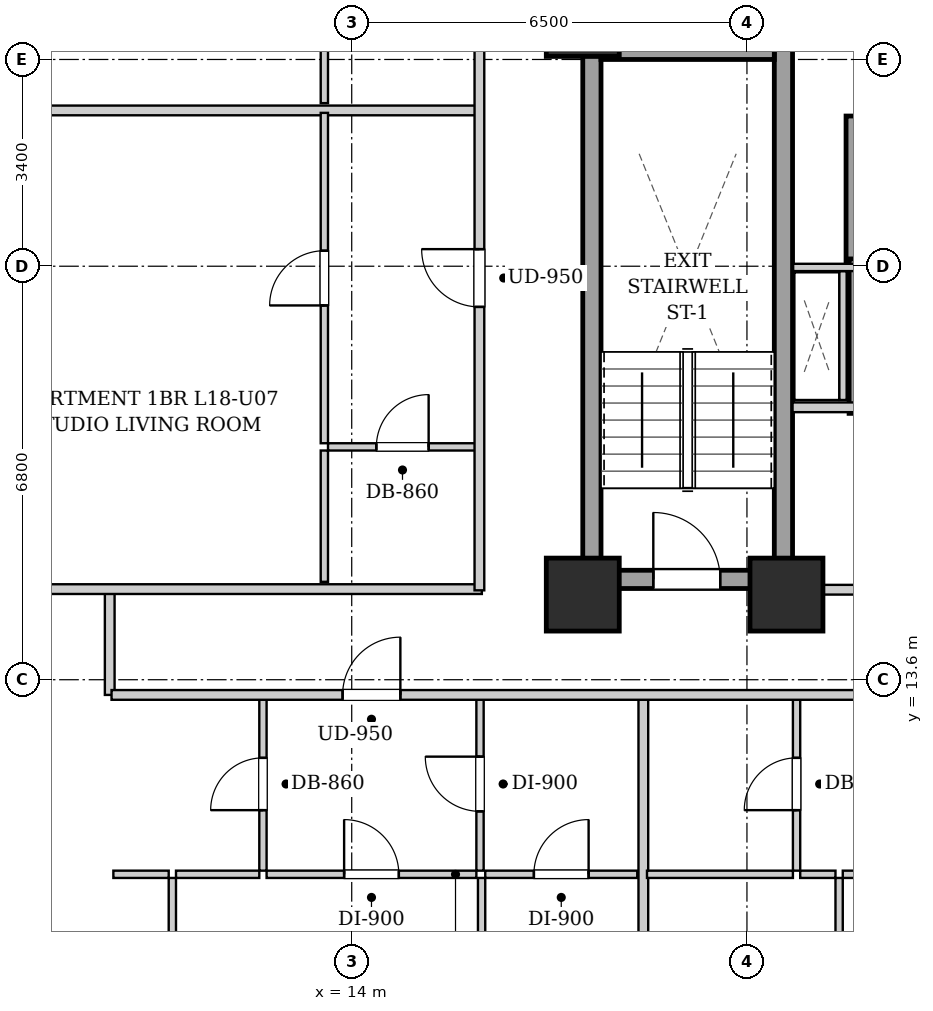
"""IFC4 building model, lengths in metres.
Left out: names, types, materials, properties, quantities, classifications, styles, units other than length and angle.
Written with IfcOpenShell. Run it as: python <this file> out.ifc"""

import sys

from ifc_helpers import new_model, si_unit, direction, frame, frame_2d, origin, origin_2d, place, context, subcontext, project, spatial, rectangle, extrude, element, fill, save


model = new_model("IFC4")
c1 = context("Model", 3, precision=1e-05, world=origin(), true_north=direction((0.0, 1.0)))
c2 = subcontext(c1, "Body", "Model", "MODEL_VIEW")
j1 = project(units=[si_unit("LENGTHUNIT", "METRE"), si_unit("PLANEANGLEUNIT", "RADIAN")], contexts=[c1])
p1 = place(None, origin())
s1 = spatial("IfcSite", under=j1, at=p1, CompositionType="ELEMENT")
p2 = place(p1, origin())
s2 = spatial("IfcBuilding", under=s1, at=p2, CompositionType="ELEMENT")
p3 = place(p2, frame((0.0, 0.0, 67.4)))
s3 = spatial("IfcBuildingStorey", under=s2, at=p3, CompositionType="ELEMENT", Elevation=67.4)
for number, where, z_axis, x_axis in (
    (1, (17.8, 15.0, 0.0), (0.0, 0.0, 1.0), (1.0, 0.0, 0.0)),
    (2, (21.15, 15.0, 0.0), (0.0, 0.0, 1.0), (1.0, 0.0, 0.0)),
    (3, (17.8, 24.45, 0.0), (0.0, 0.0, 1.0), (1.0, 0.0, 0.0)),
):
    element("IfcColumn", number, at=place(p3, frame(where, z_axis=z_axis, x_axis=x_axis)), inside=s3, PredefinedType="COLUMN", context=c2, shape_type="SweptSolid", body=[
        extrude(rectangle(XDim=1.2, YDim=1.2, at=origin_2d()), origin(), (0.0, 0.0, 1.0), 3.2),
    ])
for number, where, z_axis, x_axis in (
    (4, (17.95, 15.1, 0.0), (0.0, 0.0, 1.0), (0.0, 1.0, 0.0)),
    (5, (21.1, 15.1, 0.0), (0.0, 0.0, 1.0), (0.0, 1.0, 0.0)),
):
    element("IfcWall", number, at=place(p3, frame(where, z_axis=z_axis, x_axis=x_axis)), inside=s3, PredefinedType="SHEAR", context=c2, shape_type="SweptSolid", body=[
        extrude(rectangle(XDim=9.0, YDim=0.3, at=frame_2d((4.5, 0.0))), origin(), (0.0, 0.0, 1.0), 2.88),
    ])
p4 = place(p3, frame((18.1, 23.95, 0.0), z_axis=(0.0, 0.0, 1.0), x_axis=(1.0, 0.0, 0.0)))
e6 = element("IfcWall", 6, at=p4, inside=s3, PredefinedType="SHEAR", context=c2, shape_type="SweptSolid", body=[
    extrude(rectangle(XDim=2.85, YDim=0.3, at=frame_2d((1.425, 0.0))), origin(), (0.0, 0.0, 1.0), 2.88),
])
p5 = place(p3, frame((18.1, 15.25, 0.0), z_axis=(0.0, 0.0, 1.0), x_axis=(1.0, 0.0, 0.0)))
e7 = element("IfcWall", 7, at=p5, inside=s3, PredefinedType="SHEAR", context=c2, shape_type="SweptSolid", body=[
    extrude(rectangle(XDim=2.85, YDim=0.3, at=frame_2d((1.425, 0.0))), origin(), (0.0, 0.0, 1.0), 2.88),
])
p6 = place(p5, frame((0.86, 0.0, 0.0)))
e8 = element("IfcOpeningElement", 8, at=p6, cuts=e7, PredefinedType="OPENING", context=c2, shape_type="SweptSolid", body=[
    extrude(rectangle(XDim=1.1, YDim=2.05, at=frame_2d((0.55, 1.025))), frame((0.0, 0.16, 0.0), z_axis=(0.0, -1.0, 0.0), x_axis=(1.0, 0.0, 0.0)), (0.0, 0.0, 1.0), 0.32),
])
p7 = place(p3, frame((22.24, 20.43, 0.0), z_axis=(0.0, 0.0, 1.0), x_axis=(0.0, 1.0, 0.0)))
e9 = element("IfcWall", 9, at=p7, inside=s3, PredefinedType="SHEAR", context=c2, shape_type="SweptSolid", body=[
    extrude(rectangle(XDim=2.44, YDim=0.22, at=frame_2d((1.22, 0.0))), origin(), (0.0, 0.0, 1.0), 2.88),
])
p8 = place(p3, frame((22.29, 17.98, 0.0), z_axis=(0.0, 0.0, 1.0), x_axis=(0.0, 1.0, 0.0)))
e10 = element("IfcWall", 10, at=p8, inside=s3, PredefinedType="SHEAR", context=c2, shape_type="SweptSolid", body=[
    extrude(rectangle(XDim=2.54, YDim=0.22, at=frame_2d((1.27, 0.0))), origin(), (0.0, 0.0, 1.0), 2.88),
])
p9 = place(p3, frame((21.25, 15.08, 0.0), z_axis=(0.0, 0.0, 1.0), x_axis=(1.0, 0.0, 0.0)))
e11 = element("IfcWall", 11, at=p9, inside=s3, PredefinedType="PARTITIONING", context=c2, shape_type="SweptSolid", body=[
    extrude(rectangle(XDim=8.5, YDim=0.16, at=frame_2d((4.25, 0.0))), origin(), (0.0, 0.0, 1.0), 2.172),
])
p10 = place(p9, frame((3.725, 0.0, 0.0)))
e12 = element("IfcOpeningElement", 12, at=p10, cuts=e11, PredefinedType="OPENING", context=c2, shape_type="SweptSolid", body=[
    extrude(rectangle(XDim=1.05, YDim=2.05, at=frame_2d((0.525, 1.025))), frame((0.0, 0.09, 0.0), z_axis=(0.0, -1.0, 0.0), x_axis=(1.0, 0.0, 0.0)), (0.0, 0.0, 1.0), 0.18),
])
p11 = place(p3, frame((21.25, 18.08, 0.0), z_axis=(0.0, 0.0, 1.0), x_axis=(1.0, 0.0, 0.0)))
e13 = element("IfcWall", 13, at=p11, inside=s3, PredefinedType="PARTITIONING", context=c2, shape_type="SweptSolid", body=[
    extrude(rectangle(XDim=1.1, YDim=0.16, at=frame_2d((0.55, 0.0))), origin(), (0.0, 0.0, 1.0), 2.88),
])
p12 = place(p3, frame((22.08, 18.2, 0.0), z_axis=(0.0, 0.0, 1.0), x_axis=(0.0, 1.0, 0.0)))
e14 = element("IfcWall", 14, at=p12, inside=s3, PredefinedType="PARTITIONING", context=c2, shape_type="SweptSolid", body=[
    extrude(rectangle(XDim=2.12, YDim=0.12, at=frame_2d((1.06, 0.0))), origin(), (0.0, 0.0, 1.0), 2.88),
])
p13 = place(p3, frame((22.28, 20.38, 0.0), z_axis=(0.0, 0.0, 1.0), x_axis=(-1.0, 0.0, 0.0)))
e15 = element("IfcWall", 15, at=p13, inside=s3, PredefinedType="PARTITIONING", context=c2, shape_type="SweptSolid", body=[
    extrude(rectangle(XDim=1.02, YDim=0.12, at=frame_2d((0.51, 0.0))), origin(), (0.0, 0.0, 1.0), 2.88),
])
p14 = place(p3, frame((10.02, 13.35, 0.0), z_axis=(0.0, 0.0, 1.0), x_axis=(0.0, 1.0, 0.0)))
e16 = element("IfcWall", 16, at=p14, inside=s3, PredefinedType="PARTITIONING", context=c2, shape_type="SweptSolid", body=[
    extrude(rectangle(XDim=1.74, YDim=0.16, at=frame_2d((0.87, 0.0))), origin(), (0.0, 0.0, 1.0), 2.88),
])
p15 = place(p3, frame((7.78, 15.09, 0.0), z_axis=(0.0, 0.0, 1.0), x_axis=(1.0, 0.0, 0.0)))
e17 = element("IfcWall", 17, at=p15, inside=s3, PredefinedType="PARTITIONING", context=c2, shape_type="SweptSolid", body=[
    extrude(rectangle(XDim=8.36, YDim=0.16, at=frame_2d((4.18, 0.0))), origin(), (0.0, 0.0, 1.0), 2.172),
])
p16 = place(p3, frame((12.54, 10.46, 0.0), z_axis=(0.0, 0.0, 1.0), x_axis=(0.0, 1.0, 0.0)))
e18 = element("IfcWall", 18, at=p16, inside=s3, PredefinedType="PARTITIONING", context=c2, shape_type="SweptSolid", body=[
    extrude(rectangle(XDim=2.85, YDim=0.12, at=frame_2d((1.425, 0.0))), origin(), (0.0, 0.0, 1.0), 2.88),
])
p17 = place(p16, frame((0.995, 0.0, 0.0)))
e19 = element("IfcOpeningElement", 19, at=p17, cuts=e18, PredefinedType="OPENING", context=c2, shape_type="SweptSolid", body=[
    extrude(rectangle(XDim=0.86, YDim=2.05, at=frame_2d((0.43, 1.025))), frame((0.0, 0.07, 0.0), z_axis=(0.0, -1.0, 0.0), x_axis=(1.0, 0.0, 0.0)), (0.0, 0.0, 1.0), 0.14),
])
p18 = place(p3, frame((10.08, 10.4, 0.0), z_axis=(0.0, 0.0, 1.0), x_axis=(1.0, 0.0, 0.0)))
e20 = element("IfcWall", 20, at=p18, inside=s3, PredefinedType="PARTITIONING", context=c2, shape_type="SweptSolid", body=[
    extrude(rectangle(XDim=0.91, YDim=0.12, at=frame_2d((0.455, 0.0))), origin(), (0.0, 0.0, 1.0), 2.88),
])
p19 = place(p3, frame((11.11, 10.4, 0.0), z_axis=(0.0, 0.0, 1.0), x_axis=(1.0, 0.0, 0.0)))
e21 = element("IfcWall", 21, at=p19, inside=s3, PredefinedType="PARTITIONING", context=c2, shape_type="SweptSolid", body=[
    extrude(rectangle(XDim=1.37, YDim=0.12, at=frame_2d((0.685, 0.0))), origin(), (0.0, 0.0, 1.0), 2.88),
])
p20 = place(p3, frame((16.11, 10.46, 0.0), z_axis=(0.0, 0.0, 1.0), x_axis=(0.0, 1.0, 0.0)))
e22 = element("IfcWall", 22, at=p20, inside=s3, PredefinedType="PARTITIONING", context=c2, shape_type="SweptSolid", body=[
    extrude(rectangle(XDim=2.85, YDim=0.12, at=frame_2d((1.425, 0.0))), origin(), (0.0, 0.0, 1.0), 2.88),
])
p21 = place(p20, frame((0.975, 0.0, 0.0)))
e23 = element("IfcOpeningElement", 23, at=p21, cuts=e22, PredefinedType="OPENING", context=c2, shape_type="SweptSolid", body=[
    extrude(rectangle(XDim=0.9, YDim=2.05, at=frame_2d((0.45, 1.025))), frame((0.0, 0.07, 0.0), z_axis=(0.0, -1.0, 0.0), x_axis=(1.0, 0.0, 0.0)), (0.0, 0.0, 1.0), 0.14),
])
p22 = place(p3, frame((12.6, 10.4, 0.0), z_axis=(0.0, 0.0, 1.0), x_axis=(1.0, 0.0, 0.0)))
e24 = element("IfcWall", 24, at=p22, inside=s3, PredefinedType="PARTITIONING", context=c2, shape_type="SweptSolid", body=[
    extrude(rectangle(XDim=3.45, YDim=0.12, at=frame_2d((1.725, 0.0))), origin(), (0.0, 0.0, 1.0), 2.88),
])
p23 = place(p22, frame((1.275, 0.0, 0.0)))
e25 = element("IfcOpeningElement", 25, at=p23, cuts=e24, PredefinedType="OPENING", context=c2, shape_type="SweptSolid", body=[
    extrude(rectangle(XDim=0.9, YDim=2.05, at=frame_2d((0.45, 1.025))), frame((0.0, 0.07, 0.0), z_axis=(0.0, -1.0, 0.0), x_axis=(1.0, 0.0, 0.0)), (0.0, 0.0, 1.0), 0.14),
])
p24 = place(p3, frame((16.196, 10.4, 0.0), z_axis=(0.0, 0.0, 1.0), x_axis=(1.0, 0.0, 0.0)))
e26 = element("IfcWall", 26, at=p24, inside=s3, PredefinedType="PARTITIONING", context=c2, shape_type="SweptSolid", body=[
    extrude(rectangle(XDim=2.5, YDim=0.12, at=frame_2d((1.25, 0.0))), origin(), (0.0, 0.0, 1.0), 2.88),
])
p25 = place(p24, frame((0.8, 0.0, 0.0)))
e27 = element("IfcOpeningElement", 27, at=p25, cuts=e26, PredefinedType="OPENING", context=c2, shape_type="SweptSolid", body=[
    extrude(rectangle(XDim=0.9, YDim=2.05, at=frame_2d((0.45, 1.025))), frame((0.0, 0.07, 0.0), z_axis=(0.0, -1.0, 0.0), x_axis=(1.0, 0.0, 0.0)), (0.0, 0.0, 1.0), 0.14),
])
p26 = place(p3, frame((11.05, 0.28, 0.0), z_axis=(0.0, 0.0, 1.0), x_axis=(0.0, 1.0, 0.0)))
e28 = element("IfcWall", 28, at=p26, inside=s3, PredefinedType="PARTITIONING", context=c2, shape_type="SweptSolid", body=[
    extrude(rectangle(XDim=10.06, YDim=0.12, at=frame_2d((5.03, 0.0))), origin(), (0.0, 0.0, 1.0), 2.88),
])
p27 = place(p26, frame((4.565, 0.0, 0.0)))
e29 = element("IfcOpeningElement", 29, at=p27, cuts=e28, PredefinedType="OPENING", context=c2, shape_type="SweptSolid", body=[
    extrude(rectangle(XDim=0.9, YDim=2.05, at=frame_2d((0.45, 1.025))), frame((0.0, 0.07, 0.0), z_axis=(0.0, -1.0, 0.0), x_axis=(1.0, 0.0, 0.0)), (0.0, 0.0, 1.0), 0.14),
])
p28 = place(p3, frame((16.136, 2.43, 0.0), z_axis=(0.0, 0.0, 1.0), x_axis=(0.0, 1.0, 0.0)))
e30 = element("IfcWall", 30, at=p28, inside=s3, PredefinedType="PARTITIONING", context=c2, shape_type="SweptSolid", body=[
    extrude(rectangle(XDim=7.91, YDim=0.12, at=frame_2d((3.955, 0.0))), origin(), (0.0, 0.0, 1.0), 2.88),
])
p29 = place(p28, frame((3.505, 0.0, 0.0)))
e31 = element("IfcOpeningElement", 31, at=p29, cuts=e30, PredefinedType="OPENING", context=c2, shape_type="SweptSolid", body=[
    extrude(rectangle(XDim=0.9, YDim=2.05, at=frame_2d((0.45, 1.025))), frame((0.0, 0.07, 0.0), z_axis=(0.0, -1.0, 0.0), x_axis=(1.0, 0.0, 0.0)), (0.0, 0.0, 1.0), 0.14),
])
p30 = place(p3, frame((18.796, 0.28, 0.0), z_axis=(0.0, 0.0, 1.0), x_axis=(0.0, 1.0, 0.0)))
e32 = element("IfcWall", 32, at=p30, inside=s3, PredefinedType="PARTITIONING", context=c2, shape_type="SweptSolid", body=[
    extrude(rectangle(XDim=13.03, YDim=0.16, at=frame_2d((6.515, 0.0))), origin(), (0.0, 0.0, 1.0), 2.88),
])
p31 = place(p3, frame((21.316, 10.46, 0.0), z_axis=(0.0, 0.0, 1.0), x_axis=(0.0, 1.0, 0.0)))
e33 = element("IfcWall", 33, at=p31, inside=s3, PredefinedType="PARTITIONING", context=c2, shape_type="SweptSolid", body=[
    extrude(rectangle(XDim=2.85, YDim=0.12, at=frame_2d((1.425, 0.0))), origin(), (0.0, 0.0, 1.0), 2.88),
])
p32 = place(p31, frame((0.995, 0.0, 0.0)))
e34 = element("IfcOpeningElement", 34, at=p32, cuts=e33, PredefinedType="OPENING", context=c2, shape_type="SweptSolid", body=[
    extrude(rectangle(XDim=0.86, YDim=2.05, at=frame_2d((0.43, 1.025))), frame((0.0, 0.07, 0.0), z_axis=(0.0, -1.0, 0.0), x_axis=(1.0, 0.0, 0.0)), (0.0, 0.0, 1.0), 0.14),
])
p33 = place(p3, frame((18.856, 10.4, 0.0), z_axis=(0.0, 0.0, 1.0), x_axis=(1.0, 0.0, 0.0)))
e35 = element("IfcWall", 35, at=p33, inside=s3, PredefinedType="PARTITIONING", context=c2, shape_type="SweptSolid", body=[
    extrude(rectangle(XDim=2.4, YDim=0.12, at=frame_2d((1.2, 0.0))), origin(), (0.0, 0.0, 1.0), 2.88),
])
p34 = place(p3, frame((21.376, 10.4, 0.0), z_axis=(0.0, 0.0, 1.0), x_axis=(1.0, 0.0, 0.0)))
e36 = element("IfcWall", 36, at=p34, inside=s3, PredefinedType="PARTITIONING", context=c2, shape_type="SweptSolid", body=[
    extrude(rectangle(XDim=0.58, YDim=0.12, at=frame_2d((0.29, 0.0))), origin(), (0.0, 0.0, 1.0), 2.88),
])
p35 = place(p3, frame((22.076, 10.4, 0.0), z_axis=(0.0, 0.0, 1.0), x_axis=(1.0, 0.0, 0.0)))
e37 = element("IfcWall", 37, at=p35, inside=s3, PredefinedType="PARTITIONING", context=c2, shape_type="SweptSolid", body=[
    extrude(rectangle(XDim=3.1, YDim=0.12, at=frame_2d((1.55, 0.0))), origin(), (0.0, 0.0, 1.0), 2.88),
])
p36 = place(p35, frame((1.1, 0.0, 0.0)))
e38 = element("IfcOpeningElement", 38, at=p36, cuts=e37, PredefinedType="OPENING", context=c2, shape_type="SweptSolid", body=[
    extrude(rectangle(XDim=0.9, YDim=2.05, at=frame_2d((0.45, 1.025))), frame((0.0, 0.07, 0.0), z_axis=(0.0, -1.0, 0.0), x_axis=(1.0, 0.0, 0.0)), (0.0, 0.0, 1.0), 0.14),
])
p37 = place(p3, frame((22.016, 0.28, 0.0), z_axis=(0.0, 0.0, 1.0), x_axis=(0.0, 1.0, 0.0)))
e39 = element("IfcWall", 39, at=p37, inside=s3, PredefinedType="PARTITIONING", context=c2, shape_type="SweptSolid", body=[
    extrude(rectangle(XDim=10.06, YDim=0.12, at=frame_2d((5.03, 0.0))), origin(), (0.0, 0.0, 1.0), 2.88),
])
p38 = place(p37, frame((4.565, 0.0, 0.0)))
e40 = element("IfcOpeningElement", 40, at=p38, cuts=e39, PredefinedType="OPENING", context=c2, shape_type="SweptSolid", body=[
    extrude(rectangle(XDim=0.9, YDim=2.05, at=frame_2d((0.45, 1.025))), frame((0.0, 0.07, 0.0), z_axis=(0.0, -1.0, 0.0), x_axis=(1.0, 0.0, 0.0)), (0.0, 0.0, 1.0), 0.14),
])
p39 = place(p3, frame((7.78, 22.962, 0.0), z_axis=(0.0, 0.0, 1.0), x_axis=(1.0, 0.0, 0.0)))
e41 = element("IfcWall", 41, at=p39, inside=s3, PredefinedType="PARTITIONING", context=c2, shape_type="SweptSolid", body=[
    extrude(rectangle(XDim=8.28, YDim=0.16, at=frame_2d((4.14, 0.0))), origin(), (0.0, 0.0, 1.0), 2.88),
])
p40 = place(p3, frame((13.61, 17.429, 0.0), z_axis=(0.0, 0.0, 1.0), x_axis=(1.0, 0.0, 0.0)))
e42 = element("IfcWall", 42, at=p40, inside=s3, PredefinedType="PARTITIONING", context=c2, shape_type="SweptSolid", body=[
    extrude(rectangle(XDim=2.45, YDim=0.12, at=frame_2d((1.225, 0.0))), origin(), (0.0, 0.0, 1.0), 2.88),
])
p41 = place(p40, frame((0.795, 0.0, 0.0)))
e43 = element("IfcOpeningElement", 43, at=p41, cuts=e42, PredefinedType="OPENING", context=c2, shape_type="SweptSolid", body=[
    extrude(rectangle(XDim=0.86, YDim=2.05, at=frame_2d((0.43, 1.025))), frame((0.0, 0.07, 0.0), z_axis=(0.0, -1.0, 0.0), x_axis=(1.0, 0.0, 0.0)), (0.0, 0.0, 1.0), 0.14),
])
p42 = place(p3, frame((13.55, 15.21, 0.0), z_axis=(0.0, 0.0, 1.0), x_axis=(0.0, 1.0, 0.0)))
e44 = element("IfcWall", 44, at=p42, inside=s3, PredefinedType="PARTITIONING", context=c2, shape_type="SweptSolid", body=[
    extrude(rectangle(XDim=2.159, YDim=0.12, at=frame_2d((1.08, 0.0))), origin(), (0.0, 0.0, 1.0), 2.88),
])
p43 = place(p3, frame((13.55, 17.489, 0.0), z_axis=(0.0, 0.0, 1.0), x_axis=(0.0, 1.0, 0.0)))
e45 = element("IfcWall", 45, at=p43, inside=s3, PredefinedType="PARTITIONING", context=c2, shape_type="SweptSolid", body=[
    extrude(rectangle(XDim=5.433, YDim=0.12, at=frame_2d((2.717, 0.0))), origin(), (0.0, 0.0, 1.0), 2.88),
])
p44 = place(p43, frame((2.266, 0.0, 0.0)))
e46 = element("IfcOpeningElement", 46, at=p44, cuts=e45, PredefinedType="OPENING", context=c2, shape_type="SweptSolid", body=[
    extrude(rectangle(XDim=0.9, YDim=2.05, at=frame_2d((0.45, 1.025))), frame((0.0, 0.07, 0.0), z_axis=(0.0, -1.0, 0.0), x_axis=(1.0, 0.0, 0.0)), (0.0, 0.0, 1.0), 0.14),
])
p45 = place(p3, frame((13.55, 23.082, 0.0), z_axis=(0.0, 0.0, 1.0), x_axis=(0.0, 1.0, 0.0)))
e47 = element("IfcWall", 47, at=p45, inside=s3, PredefinedType="PARTITIONING", context=c2, shape_type="SweptSolid", body=[
    extrude(rectangle(XDim=1.85, YDim=0.12, at=frame_2d((0.925, 0.0))), origin(), (0.0, 0.0, 1.0), 2.88),
])
p46 = place(p3, frame((10.05, 13.35, 0.0), z_axis=(0.0, 0.0, 1.0), x_axis=(1.0, 0.0, 0.0)))
e48 = element("IfcWall", 48, at=p46, inside=s3, PredefinedType="PARTITIONING", context=c2, shape_type="SweptSolid", body=[
    extrude(rectangle(XDim=33.9, YDim=0.16, at=frame_2d((16.95, 0.0))), origin(), (0.0, 0.0, 1.0), 2.88),
])
p47 = place(p46, frame((3.8, 0.0, 0.0)))
e49 = element("IfcOpeningElement", 49, at=p47, cuts=e48, PredefinedType="OPENING", context=c2, shape_type="SweptSolid", body=[
    extrude(rectangle(XDim=0.95, YDim=2.1, at=frame_2d((0.475, 1.05))), frame((0.0, 0.09, 0.0), z_axis=(0.0, -1.0, 0.0), x_axis=(1.0, 0.0, 0.0)), (0.0, 0.0, 1.0), 0.18),
])
p48 = place(p46, frame((13.071, 0.0, 0.0)))
e50 = element("IfcOpeningElement", 50, at=p48, cuts=e48, PredefinedType="OPENING", context=c2, shape_type="SweptSolid", body=[
    extrude(rectangle(XDim=0.95, YDim=2.1, at=frame_2d((0.475, 1.05))), frame((0.0, 0.09, 0.0), z_axis=(0.0, -1.0, 0.0), x_axis=(1.0, 0.0, 0.0)), (0.0, 0.0, 1.0), 0.18),
])
p49 = place(p3, frame((16.1, 15.07, 0.0), z_axis=(0.0, 0.0, 1.0), x_axis=(0.0, 1.0, 0.0)))
e51 = element("IfcWall", 51, at=p49, inside=s3, PredefinedType="PARTITIONING", context=c2, shape_type="SweptSolid", body=[
    extrude(rectangle(XDim=13.93, YDim=0.16, at=frame_2d((6.965, 0.0))), origin(), (0.0, 0.0, 1.0), 2.88),
])
p50 = place(p49, frame((4.661, 0.0, 0.0)))
e52 = element("IfcOpeningElement", 52, at=p50, cuts=e51, PredefinedType="OPENING", context=c2, shape_type="SweptSolid", body=[
    extrude(rectangle(XDim=0.95, YDim=2.1, at=frame_2d((0.475, 1.05))), frame((0.0, 0.09, 0.0), z_axis=(0.0, -1.0, 0.0), x_axis=(1.0, 0.0, 0.0)), (0.0, 0.0, 1.0), 0.18),
])
p51 = place(p49, frame((11.411, 0.0, 0.0)))
e53 = element("IfcOpeningElement", 53, at=p51, cuts=e51, PredefinedType="OPENING", context=c2, shape_type="SweptSolid", body=[
    extrude(rectangle(XDim=0.95, YDim=2.1, at=frame_2d((0.475, 1.05))), frame((0.0, 0.09, 0.0), z_axis=(0.0, -1.0, 0.0), x_axis=(1.0, 0.0, 0.0)), (0.0, 0.0, 1.0), 0.18),
])
p52 = place(p6, origin())
e54 = element("IfcDoor", 54, at=p52, inside=s3, OperationType="SINGLE_SWING_LEFT", PredefinedType="DOOR", context=c2, shape_type="SweptSolid", body=[
    extrude(rectangle(XDim=1.1, YDim=2.05, at=frame_2d((0.55, 1.025))), frame((0.0, 0.025, 0.0), z_axis=(0.0, -1.0, 0.0), x_axis=(1.0, 0.0, 0.0)), (0.0, 0.0, 1.0), 0.05),
])
fill(e8, e54)
p53 = place(p17, origin())
e55 = element("IfcDoor", 55, at=p53, inside=s3, OperationType="SINGLE_SWING_LEFT", PredefinedType="DOOR", context=c2, shape_type="SweptSolid", body=[
    extrude(rectangle(XDim=0.86, YDim=2.05, at=frame_2d((0.43, 1.025))), frame((0.0, 0.025, 0.0), z_axis=(0.0, -1.0, 0.0), x_axis=(1.0, 0.0, 0.0)), (0.0, 0.0, 1.0), 0.05),
])
fill(e19, e55)
p54 = place(p21, origin())
e56 = element("IfcDoor", 56, at=p54, inside=s3, OperationType="SINGLE_SWING_RIGHT", PredefinedType="DOOR", context=c2, shape_type="SweptSolid", body=[
    extrude(rectangle(XDim=0.9, YDim=2.05, at=frame_2d((0.45, 1.025))), frame((0.0, 0.025, 0.0), z_axis=(0.0, -1.0, 0.0), x_axis=(1.0, 0.0, 0.0)), (0.0, 0.0, 1.0), 0.05),
])
fill(e23, e56)
p55 = place(p23, origin())
e57 = element("IfcDoor", 57, at=p55, inside=s3, OperationType="SINGLE_SWING_LEFT", PredefinedType="DOOR", context=c2, shape_type="SweptSolid", body=[
    extrude(rectangle(XDim=0.9, YDim=2.05, at=frame_2d((0.45, 1.025))), frame((0.0, 0.025, 0.0), z_axis=(0.0, -1.0, 0.0), x_axis=(1.0, 0.0, 0.0)), (0.0, 0.0, 1.0), 0.05),
])
fill(e25, e57)
p56 = place(p25, origin())
e58 = element("IfcDoor", 58, at=p56, inside=s3, OperationType="SINGLE_SWING_RIGHT", PredefinedType="DOOR", context=c2, shape_type="SweptSolid", body=[
    extrude(rectangle(XDim=0.9, YDim=2.05, at=frame_2d((0.45, 1.025))), frame((0.0, 0.025, 0.0), z_axis=(0.0, -1.0, 0.0), x_axis=(1.0, 0.0, 0.0)), (0.0, 0.0, 1.0), 0.05),
])
fill(e27, e58)
p57 = place(p32, origin())
e59 = element("IfcDoor", 59, at=p57, inside=s3, OperationType="SINGLE_SWING_LEFT", PredefinedType="DOOR", context=c2, shape_type="SweptSolid", body=[
    extrude(rectangle(XDim=0.86, YDim=2.05, at=frame_2d((0.43, 1.025))), frame((0.0, 0.025, 0.0), z_axis=(0.0, -1.0, 0.0), x_axis=(1.0, 0.0, 0.0)), (0.0, 0.0, 1.0), 0.05),
])
fill(e34, e59)
p58 = place(p41, origin())
e60 = element("IfcDoor", 60, at=p58, inside=s3, OperationType="SINGLE_SWING_RIGHT", PredefinedType="DOOR", context=c2, shape_type="SweptSolid", body=[
    extrude(rectangle(XDim=0.86, YDim=2.05, at=frame_2d((0.43, 1.025))), frame((0.0, 0.025, 0.0), z_axis=(0.0, -1.0, 0.0), x_axis=(1.0, 0.0, 0.0)), (0.0, 0.0, 1.0), 0.05),
])
fill(e43, e60)
p59 = place(p44, origin())
e61 = element("IfcDoor", 61, at=p59, inside=s3, OperationType="SINGLE_SWING_LEFT", PredefinedType="DOOR", context=c2, shape_type="SweptSolid", body=[
    extrude(rectangle(XDim=0.9, YDim=2.05, at=frame_2d((0.45, 1.025))), frame((0.0, 0.025, 0.0), z_axis=(0.0, -1.0, 0.0), x_axis=(1.0, 0.0, 0.0)), (0.0, 0.0, 1.0), 0.05),
])
fill(e46, e61)
p60 = place(p47, origin())
e62 = element("IfcDoor", 62, at=p60, inside=s3, OperationType="SINGLE_SWING_RIGHT", PredefinedType="DOOR", context=c2, shape_type="SweptSolid", body=[
    extrude(rectangle(XDim=0.95, YDim=2.1, at=frame_2d((0.475, 1.05))), frame((0.0, 0.025, 0.0), z_axis=(0.0, -1.0, 0.0), x_axis=(1.0, 0.0, 0.0)), (0.0, 0.0, 1.0), 0.05),
])
fill(e49, e62)
p61 = place(p50, origin())
e63 = element("IfcDoor", 63, at=p61, inside=s3, OperationType="SINGLE_SWING_RIGHT", PredefinedType="DOOR", context=c2, shape_type="SweptSolid", body=[
    extrude(rectangle(XDim=0.95, YDim=2.1, at=frame_2d((0.475, 1.05))), frame((0.0, 0.025, 0.0), z_axis=(0.0, -1.0, 0.0), x_axis=(1.0, 0.0, 0.0)), (0.0, 0.0, 1.0), 0.05),
])
fill(e52, e63)
save(model, sys.argv[1])
